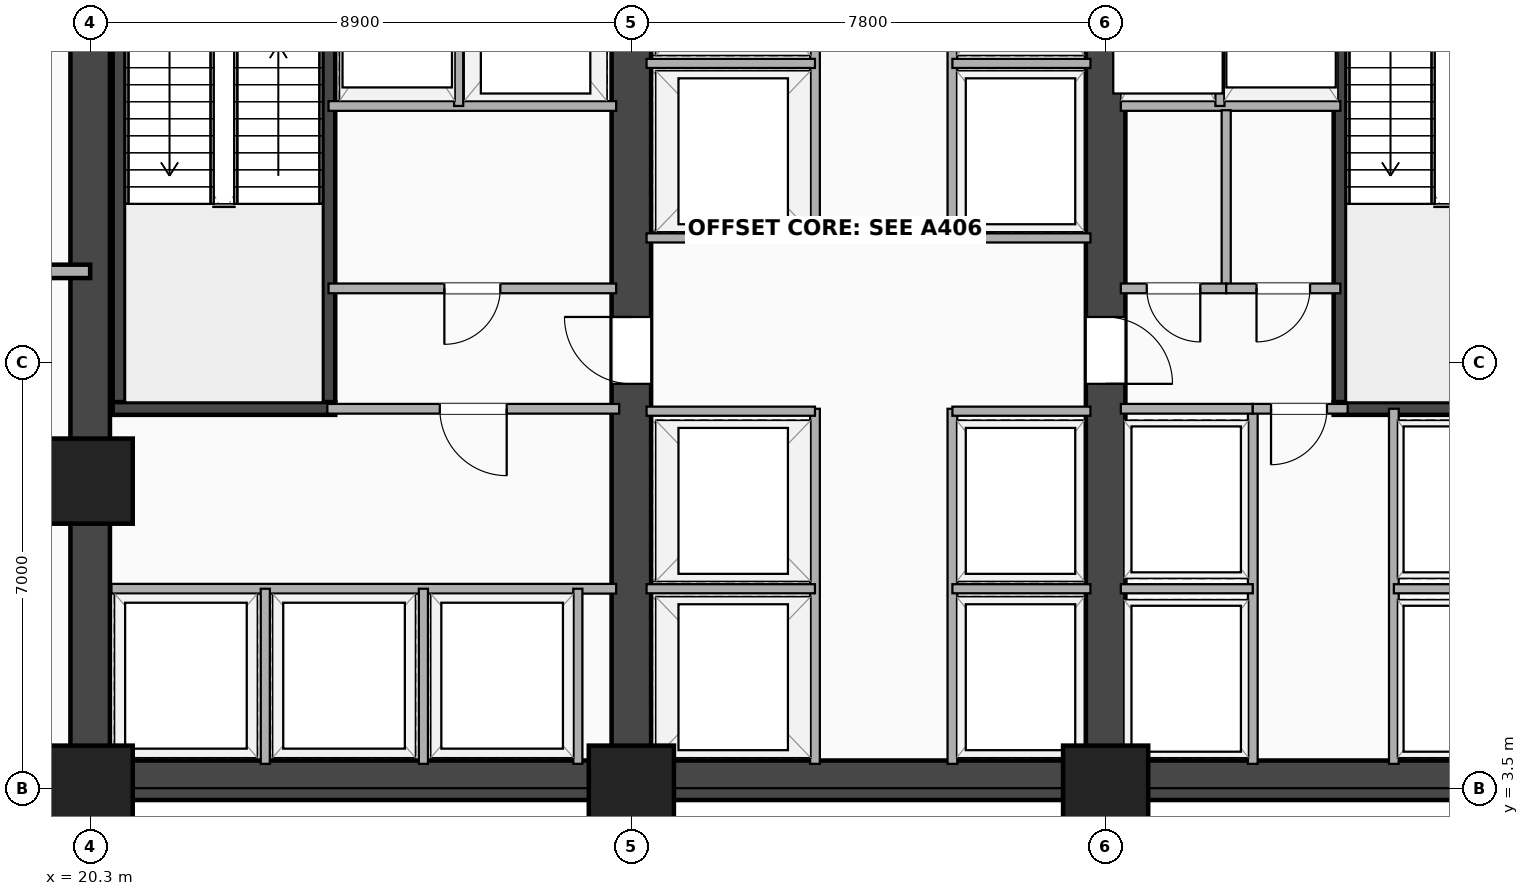
"""IFC4 building model, lengths in metres.
Left out: names, types, materials, properties, quantities, classifications, styles, units other than length and angle.
Written with IfcOpenShell. Run it as: python <this file> out.ifc"""

import sys

from ifc_helpers import new_model, si_unit, direction, frame, frame_2d, origin, origin_2d, place, context, subcontext, project, spatial, rectangle, extrude, element, fill, save


model = new_model("IFC4")
c1 = context("Model", 3, precision=1e-05, world=origin(), true_north=direction((0.0, 1.0)))
c2 = subcontext(c1, "Body", "Model", "MODEL_VIEW")
j1 = project(units=[si_unit("LENGTHUNIT", "METRE"), si_unit("PLANEANGLEUNIT", "RADIAN")], contexts=[c1])
p1 = place(None, origin())
s1 = spatial("IfcSite", under=j1, at=p1, CompositionType="ELEMENT")
p2 = place(p1, origin())
s2 = spatial("IfcBuilding", under=s1, at=p2, CompositionType="ELEMENT")
p3 = place(p2, frame((0.0, 0.0, 75.4)))
s3 = spatial("IfcBuildingStorey", under=s2, at=p3, CompositionType="ELEMENT", Elevation=75.4)
p4 = place(p3, frame((20.3, 3.63, 0.0), z_axis=(0.0, 0.0, 1.0), x_axis=(1.0, 0.0, 0.0)))
e1 = element("IfcWall", 1, at=p4, inside=s3, PredefinedType="SHEAR", context=c2, shape_type="SweptSolid", body=[
    extrude(rectangle(XDim=24.5, YDim=0.65, at=frame_2d((12.25, 0.0))), origin(), (0.0, 0.0, 1.0), 8.14),
])
p5 = place(p3, frame((20.3, 3.5, 0.0), z_axis=(0.0, 0.0, 1.0), x_axis=(0.0, 1.0, 0.0)))
e2 = element("IfcWall", 2, at=p5, inside=s3, PredefinedType="SHEAR", context=c2, shape_type="SweptSolid", body=[
    extrude(rectangle(XDim=16.9, YDim=0.65, at=frame_2d((8.45, 0.0))), origin(), (0.0, 0.0, 1.0), 8.14),
])
p6 = place(p3, frame((29.2, 3.5, 0.0), z_axis=(0.0, 0.0, 1.0), x_axis=(0.0, 1.0, 0.0)))
e3 = element("IfcWall", 3, at=p6, inside=s3, PredefinedType="SHEAR", context=c2, shape_type="SweptSolid", body=[
    extrude(rectangle(XDim=16.9, YDim=0.65, at=frame_2d((8.45, 0.0))), origin(), (0.0, 0.0, 1.0), 8.14),
])
p7 = place(p6, frame((7.75, 0.0, 0.0), z_axis=(0.0, 0.0, 1.0), x_axis=(-1.0, 0.0, 0.0)))
e4 = element("IfcOpeningElement", 4, at=p7, cuts=e3, PredefinedType="OPENING", context=c2, shape_type="SweptSolid", body=[
    extrude(rectangle(XDim=1.1, YDim=2.15, at=frame_2d((0.55, 1.075))), frame((0.0, 0.335, 0.0), z_axis=(0.0, -1.0, 0.0), x_axis=(1.0, 0.0, 0.0)), (0.0, 0.0, 1.0), 0.67),
])
p8 = place(p3, frame((37.0, 3.5, 0.0), z_axis=(0.0, 0.0, 1.0), x_axis=(0.0, 1.0, 0.0)))
e5 = element("IfcWall", 5, at=p8, inside=s3, PredefinedType="SHEAR", context=c2, shape_type="SweptSolid", body=[
    extrude(rectangle(XDim=16.9, YDim=0.65, at=frame_2d((8.45, 0.0))), origin(), (0.0, 0.0, 1.0), 8.14),
])
p9 = place(p8, frame((6.65, 0.0, 0.0)))
e6 = element("IfcOpeningElement", 6, at=p9, cuts=e5, PredefinedType="OPENING", context=c2, shape_type="SweptSolid", body=[
    extrude(rectangle(XDim=1.1, YDim=2.15, at=frame_2d((0.55, 1.075))), frame((0.0, 0.335, 0.0), z_axis=(0.0, -1.0, 0.0), x_axis=(1.0, 0.0, 0.0)), (0.0, 0.0, 1.0), 0.67),
])
for number, where, z_axis, x_axis in (
    (7, (20.775, 9.745, 0.0), (0.0, 0.0, 1.0), (0.0, 1.0, 0.0)),
    (8, (24.225, 9.745, 0.0), (0.0, 0.0, 1.0), (0.0, 1.0, 0.0)),
):
    element("IfcWall", number, at=place(p3, frame(where, z_axis=z_axis, x_axis=x_axis)), inside=s3, PredefinedType="SHEAR", context=c2, shape_type="SweptSolid", body=[
        extrude(rectangle(XDim=8.01, YDim=0.21, at=frame_2d((4.005, 0.0))), origin(), (0.0, 0.0, 1.0), 8.14),
    ])
p10 = place(p3, frame((20.67, 9.745, 0.0), z_axis=(0.0, 0.0, 1.0), x_axis=(1.0, 0.0, 0.0)))
e9 = element("IfcWall", 9, at=p10, inside=s3, PredefinedType="SHEAR", context=c2, shape_type="SweptSolid", body=[
    extrude(rectangle(XDim=3.66, YDim=0.21, at=frame_2d((1.83, 0.0))), origin(), (0.0, 0.0, 1.0), 8.14),
])
p11 = place(p3, frame((40.855, 9.745, 0.0), z_axis=(0.0, 0.0, 1.0), x_axis=(0.0, 1.0, 0.0)))
e10 = element("IfcWall", 10, at=p11, inside=s3, PredefinedType="SHEAR", context=c2, shape_type="SweptSolid", body=[
    extrude(rectangle(XDim=8.01, YDim=0.21, at=frame_2d((4.005, 0.0))), origin(), (0.0, 0.0, 1.0), 8.14),
])
p12 = place(p3, frame((40.75, 9.745, 0.0), z_axis=(0.0, 0.0, 1.0), x_axis=(1.0, 0.0, 0.0)))
e11 = element("IfcWall", 11, at=p12, inside=s3, PredefinedType="SHEAR", context=c2, shape_type="SweptSolid", body=[
    extrude(rectangle(XDim=3.66, YDim=0.21, at=frame_2d((1.83, 0.0))), origin(), (0.0, 0.0, 1.0), 8.14),
])
for number, where, z_axis, x_axis in (
    (12, (20.3, 3.5, -0.32), (0.0, 0.0, 1.0), (1.0, 0.0, 0.0)),
    (13, (29.2, 3.5, -0.32), (0.0, 0.0, 1.0), (1.0, 0.0, 0.0)),
    (14, (37.0, 3.5, -0.32), (0.0, 0.0, 1.0), (1.0, 0.0, 0.0)),
    (15, (20.3, 8.55, -0.32), (0.0, 0.0, 1.0), (1.0, 0.0, 0.0)),
):
    element("IfcColumn", number, at=place(p3, frame(where, z_axis=z_axis, x_axis=x_axis)), inside=s3, PredefinedType="COLUMN", context=c2, shape_type="SweptSolid", body=[
        extrude(rectangle(XDim=1.4, YDim=1.4, at=origin_2d()), origin(), (0.0, 0.0, 1.0), 8.46),
    ])
p13 = place(p3, frame((24.22, 14.72, 0.0), z_axis=(0.0, 0.0, 1.0), x_axis=(1.0, 0.0, 0.0)))
e16 = element("IfcWall", 16, at=p13, inside=s3, PredefinedType="PARTITIONING", context=c2, shape_type="SweptSolid", body=[
    extrude(rectangle(XDim=4.73, YDim=0.16, at=frame_2d((2.365, 0.0))), origin(), (0.0, 0.0, 1.0), 8.14),
])
p14 = place(p3, frame((26.36, 14.72, 0.0), z_axis=(0.0, 0.0, 1.0), x_axis=(0.0, 1.0, 0.0)))
e17 = element("IfcWall", 17, at=p14, inside=s3, PredefinedType="PARTITIONING", context=c2, shape_type="SweptSolid", body=[
    extrude(rectangle(XDim=3.04, YDim=0.15, at=frame_2d((1.52, 0.0))), origin(), (0.0, 0.0, 1.0), 8.14),
])
p15 = place(p3, frame((37.25, 14.72, 0.0), z_axis=(0.0, 0.0, 1.0), x_axis=(1.0, 0.0, 0.0)))
e18 = element("IfcWall", 18, at=p15, inside=s3, PredefinedType="PARTITIONING", context=c2, shape_type="SweptSolid", body=[
    extrude(rectangle(XDim=3.61, YDim=0.16, at=frame_2d((1.805, 0.0))), origin(), (0.0, 0.0, 1.0), 8.14),
])
p16 = place(p3, frame((38.88, 14.72, 0.0), z_axis=(0.0, 0.0, 1.0), x_axis=(0.0, 1.0, 0.0)))
e19 = element("IfcWall", 19, at=p16, inside=s3, PredefinedType="PARTITIONING", context=c2, shape_type="SweptSolid", body=[
    extrude(rectangle(XDim=3.04, YDim=0.15, at=frame_2d((1.52, 0.0))), origin(), (0.0, 0.0, 1.0), 8.14),
])
p17 = place(p3, frame((24.22, 11.72, 0.0), z_axis=(0.0, 0.0, 1.0), x_axis=(1.0, 0.0, 0.0)))
e20 = element("IfcWall", 20, at=p17, inside=s3, PredefinedType="PARTITIONING", context=c2, shape_type="SweptSolid", body=[
    extrude(rectangle(XDim=4.73, YDim=0.16, at=frame_2d((2.365, 0.0))), origin(), (0.0, 0.0, 1.0), 8.14),
])
p18 = place(p17, frame((1.905, 0.0, 0.0)))
e21 = element("IfcOpeningElement", 21, at=p18, cuts=e20, PredefinedType="OPENING", context=c2, shape_type="SweptSolid", body=[
    extrude(rectangle(XDim=0.92, YDim=2.08, at=frame_2d((0.46, 1.04))), frame((0.0, 0.09, 0.0), z_axis=(0.0, -1.0, 0.0), x_axis=(1.0, 0.0, 0.0)), (0.0, 0.0, 1.0), 0.18),
])
p19 = place(p3, frame((38.983, 11.72, 0.0), z_axis=(0.0, 0.0, 1.0), x_axis=(0.0, 1.0, 0.0)))
e22 = element("IfcWall", 22, at=p19, inside=s3, PredefinedType="PARTITIONING", context=c2, shape_type="SweptSolid", body=[
    extrude(rectangle(XDim=2.93, YDim=0.15, at=frame_2d((1.465, 0.0))), origin(), (0.0, 0.0, 1.0), 8.14),
])
p20 = place(p3, frame((37.25, 11.72, 0.0), z_axis=(0.0, 0.0, 1.0), x_axis=(1.0, 0.0, 0.0)))
e23 = element("IfcWall", 23, at=p20, inside=s3, PredefinedType="PARTITIONING", context=c2, shape_type="SweptSolid", body=[
    extrude(rectangle(XDim=1.733, YDim=0.16, at=frame_2d((0.866, 0.0))), origin(), (0.0, 0.0, 1.0), 8.14),
])
p21 = place(p20, frame((0.427, 0.0, 0.0)))
e24 = element("IfcOpeningElement", 24, at=p21, cuts=e23, PredefinedType="OPENING", context=c2, shape_type="SweptSolid", body=[
    extrude(rectangle(XDim=0.88, YDim=2.08, at=frame_2d((0.44, 1.04))), frame((0.0, 0.09, 0.0), z_axis=(0.0, -1.0, 0.0), x_axis=(1.0, 0.0, 0.0)), (0.0, 0.0, 1.0), 0.18),
])
p22 = place(p3, frame((38.983, 11.72, 0.0), z_axis=(0.0, 0.0, 1.0), x_axis=(1.0, 0.0, 0.0)))
e25 = element("IfcWall", 25, at=p22, inside=s3, PredefinedType="PARTITIONING", context=c2, shape_type="SweptSolid", body=[
    extrude(rectangle(XDim=1.877, YDim=0.16, at=frame_2d((0.938, 0.0))), origin(), (0.0, 0.0, 1.0), 8.14),
])
p23 = place(p22, frame((0.499, 0.0, 0.0)))
e26 = element("IfcOpeningElement", 26, at=p23, cuts=e25, PredefinedType="OPENING", context=c2, shape_type="SweptSolid", body=[
    extrude(rectangle(XDim=0.88, YDim=2.08, at=frame_2d((0.44, 1.04))), frame((0.0, 0.09, 0.0), z_axis=(0.0, -1.0, 0.0), x_axis=(1.0, 0.0, 0.0)), (0.0, 0.0, 1.0), 0.18),
])
p24 = place(p3, frame((20.65, 6.78, 0.0), z_axis=(0.0, 0.0, 1.0), x_axis=(1.0, 0.0, 0.0)))
e27 = element("IfcWall", 27, at=p24, inside=s3, PredefinedType="PARTITIONING", context=c2, shape_type="SweptSolid", body=[
    extrude(rectangle(XDim=8.3, YDim=0.16, at=frame_2d((4.15, 0.0))), origin(), (0.0, 0.0, 1.0), 7.43),
])
for number, where, z_axis, x_axis in (
    (28, (23.18, 3.9, 0.0), (0.0, 0.0, 1.0), (0.0, 1.0, 0.0)),
    (29, (25.78, 3.9, 0.0), (0.0, 0.0, 1.0), (0.0, 1.0, 0.0)),
    (30, (28.32, 3.9, 0.0), (0.0, 0.0, 1.0), (0.0, 1.0, 0.0)),
):
    element("IfcWall", number, at=place(p3, frame(where, z_axis=z_axis, x_axis=x_axis)), inside=s3, PredefinedType="PARTITIONING", context=c2, shape_type="SweptSolid", body=[
        extrude(rectangle(XDim=2.88, YDim=0.15, at=frame_2d((1.44, 0.0))), origin(), (0.0, 0.0, 1.0), 8.14),
    ])
p25 = place(p3, frame((24.2, 9.74, 0.0), z_axis=(0.0, 0.0, 1.0), x_axis=(1.0, 0.0, 0.0)))
e31 = element("IfcWall", 31, at=p25, inside=s3, PredefinedType="PARTITIONING", context=c2, shape_type="SweptSolid", body=[
    extrude(rectangle(XDim=4.8, YDim=0.16, at=frame_2d((2.4, 0.0))), origin(), (0.0, 0.0, 1.0), 8.14),
])
p26 = place(p25, frame((1.85, 0.0, 0.0)))
e32 = element("IfcOpeningElement", 32, at=p26, cuts=e31, PredefinedType="OPENING", context=c2, shape_type="SweptSolid", body=[
    extrude(rectangle(XDim=1.1, YDim=2.15, at=frame_2d((0.55, 1.075))), frame((0.0, 0.09, 0.0), z_axis=(0.0, -1.0, 0.0), x_axis=(1.0, 0.0, 0.0)), (0.0, 0.0, 1.0), 0.18),
])
for number, where, z_axis, x_axis in (
    (33, (39.42, 3.9, 0.0), (0.0, 0.0, 1.0), (0.0, 1.0, 0.0)),
    (34, (41.74, 3.9, 0.0), (0.0, 0.0, 1.0), (0.0, 1.0, 0.0)),
):
    element("IfcWall", number, at=place(p3, frame(where, z_axis=z_axis, x_axis=x_axis)), inside=s3, PredefinedType="PARTITIONING", context=c2, shape_type="SweptSolid", body=[
        extrude(rectangle(XDim=5.84, YDim=0.16, at=frame_2d((2.92, 0.0))), origin(), (0.0, 0.0, 1.0), 8.14),
    ])
p27 = place(p3, frame((37.25, 6.78, 0.0), z_axis=(0.0, 0.0, 1.0), x_axis=(1.0, 0.0, 0.0)))
e35 = element("IfcWall", 35, at=p27, inside=s3, PredefinedType="PARTITIONING", context=c2, shape_type="SweptSolid", body=[
    extrude(rectangle(XDim=2.17, YDim=0.15, at=frame_2d((1.085, 0.0))), origin(), (0.0, 0.0, 1.0), 8.14),
])
p28 = place(p3, frame((41.74, 6.78, 0.0), z_axis=(0.0, 0.0, 1.0), x_axis=(1.0, 0.0, 0.0)))
e36 = element("IfcWall", 36, at=p28, inside=s3, PredefinedType="PARTITIONING", context=c2, shape_type="SweptSolid", body=[
    extrude(rectangle(XDim=2.66, YDim=0.15, at=frame_2d((1.33, 0.0))), origin(), (0.0, 0.0, 1.0), 6.445),
])
p29 = place(p3, frame((37.25, 9.74, 0.0), z_axis=(0.0, 0.0, 1.0), x_axis=(1.0, 0.0, 0.0)))
e37 = element("IfcWall", 37, at=p29, inside=s3, PredefinedType="PARTITIONING", context=c2, shape_type="SweptSolid", body=[
    extrude(rectangle(XDim=2.17, YDim=0.16, at=frame_2d((1.085, 0.0))), origin(), (0.0, 0.0, 1.0), 8.14),
])
p30 = place(p3, frame((39.42, 9.74, 0.0), z_axis=(0.0, 0.0, 1.0), x_axis=(1.0, 0.0, 0.0)))
e38 = element("IfcWall", 38, at=p30, inside=s3, PredefinedType="PARTITIONING", context=c2, shape_type="SweptSolid", body=[
    extrude(rectangle(XDim=1.56, YDim=0.16, at=frame_2d((0.78, 0.0))), origin(), (0.0, 0.0, 1.0), 8.14),
])
p31 = place(p30, frame((0.3, 0.0, 0.0)))
e39 = element("IfcOpeningElement", 39, at=p31, cuts=e38, PredefinedType="OPENING", context=c2, shape_type="SweptSolid", body=[
    extrude(rectangle(XDim=0.92, YDim=2.08, at=frame_2d((0.46, 1.04))), frame((0.0, 0.09, 0.0), z_axis=(0.0, -1.0, 0.0), x_axis=(1.0, 0.0, 0.0)), (0.0, 0.0, 1.0), 0.18),
])
for number, where, z_axis, x_axis in (
    (40, (32.22, 3.9, 0.0), (0.0, 0.0, 1.0), (0.0, 1.0, 0.0)),
    (41, (34.48, 3.9, 0.0), (0.0, 0.0, 1.0), (0.0, 1.0, 0.0)),
):
    element("IfcWall", number, at=place(p3, frame(where, z_axis=z_axis, x_axis=x_axis)), inside=s3, PredefinedType="PARTITIONING", context=c2, shape_type="SweptSolid", body=[
        extrude(rectangle(XDim=5.84, YDim=0.16, at=frame_2d((2.92, 0.0))), origin(), (0.0, 0.0, 1.0), 8.14),
    ])
p32 = place(p3, frame((29.45, 6.78, 0.0), z_axis=(0.0, 0.0, 1.0), x_axis=(1.0, 0.0, 0.0)))
e42 = element("IfcWall", 42, at=p32, inside=s3, PredefinedType="PARTITIONING", context=c2, shape_type="SweptSolid", body=[
    extrude(rectangle(XDim=2.77, YDim=0.15, at=frame_2d((1.385, 0.0))), origin(), (0.0, 0.0, 1.0), 8.14),
])
p33 = place(p3, frame((34.48, 6.78, 0.0), z_axis=(0.0, 0.0, 1.0), x_axis=(1.0, 0.0, 0.0)))
e43 = element("IfcWall", 43, at=p33, inside=s3, PredefinedType="PARTITIONING", context=c2, shape_type="SweptSolid", body=[
    extrude(rectangle(XDim=2.27, YDim=0.15, at=frame_2d((1.135, 0.0))), origin(), (0.0, 0.0, 1.0), 8.14),
])
p34 = place(p3, frame((29.45, 9.7, 0.0), z_axis=(0.0, 0.0, 1.0), x_axis=(1.0, 0.0, 0.0)))
e44 = element("IfcWall", 44, at=p34, inside=s3, PredefinedType="PARTITIONING", context=c2, shape_type="SweptSolid", body=[
    extrude(rectangle(XDim=2.77, YDim=0.15, at=frame_2d((1.385, 0.0))), origin(), (0.0, 0.0, 1.0), 8.14),
])
p35 = place(p3, frame((34.48, 9.7, 0.0), z_axis=(0.0, 0.0, 1.0), x_axis=(1.0, 0.0, 0.0)))
e45 = element("IfcWall", 45, at=p35, inside=s3, PredefinedType="PARTITIONING", context=c2, shape_type="SweptSolid", body=[
    extrude(rectangle(XDim=2.27, YDim=0.15, at=frame_2d((1.135, 0.0))), origin(), (0.0, 0.0, 1.0), 8.14),
])
p36 = place(p3, frame((32.22, 12.5, 0.0), z_axis=(0.0, 0.0, 1.0), x_axis=(0.0, 1.0, 0.0)))
e46 = element("IfcWall", 46, at=p36, inside=s3, PredefinedType="PARTITIONING", context=c2, shape_type="SweptSolid", body=[
    extrude(rectangle(XDim=7.92, YDim=0.16, at=frame_2d((3.96, 0.0))), origin(), (0.0, 0.0, 1.0), 7.43),
])
p37 = place(p36, frame((6.1, 0.0, 0.0)))
e47 = element("IfcOpeningElement", 47, at=p37, cuts=e46, PredefinedType="OPENING", context=c2, shape_type="SweptSolid", body=[
    extrude(rectangle(XDim=0.88, YDim=2.08, at=frame_2d((0.44, 1.04))), frame((0.0, 0.09, 0.0), z_axis=(0.0, -1.0, 0.0), x_axis=(1.0, 0.0, 0.0)), (0.0, 0.0, 1.0), 0.18),
])
p38 = place(p3, frame((34.48, 12.5, 0.0), z_axis=(0.0, 0.0, 1.0), x_axis=(0.0, 1.0, 0.0)))
e48 = element("IfcWall", 48, at=p38, inside=s3, PredefinedType="PARTITIONING", context=c2, shape_type="SweptSolid", body=[
    extrude(rectangle(XDim=7.92, YDim=0.16, at=frame_2d((3.96, 0.0))), origin(), (0.0, 0.0, 1.0), 7.43),
])
p39 = place(p38, frame((6.98, 0.0, 0.0), z_axis=(0.0, 0.0, 1.0), x_axis=(-1.0, 0.0, 0.0)))
e49 = element("IfcOpeningElement", 49, at=p39, cuts=e48, PredefinedType="OPENING", context=c2, shape_type="SweptSolid", body=[
    extrude(rectangle(XDim=0.88, YDim=2.08, at=frame_2d((0.44, 1.04))), frame((0.0, 0.09, 0.0), z_axis=(0.0, -1.0, 0.0), x_axis=(1.0, 0.0, 0.0)), (0.0, 0.0, 1.0), 0.18),
])
p40 = place(p3, frame((29.45, 12.55, 0.0), z_axis=(0.0, 0.0, 1.0), x_axis=(1.0, 0.0, 0.0)))
e50 = element("IfcWall", 50, at=p40, inside=s3, PredefinedType="PARTITIONING", context=c2, shape_type="SweptSolid", body=[
    extrude(rectangle(XDim=2.77, YDim=0.15, at=frame_2d((1.385, 0.0))), origin(), (0.0, 0.0, 1.0), 8.14),
])
p41 = place(p3, frame((34.48, 12.55, 0.0), z_axis=(0.0, 0.0, 1.0), x_axis=(1.0, 0.0, 0.0)))
e51 = element("IfcWall", 51, at=p41, inside=s3, PredefinedType="PARTITIONING", context=c2, shape_type="SweptSolid", body=[
    extrude(rectangle(XDim=2.27, YDim=0.15, at=frame_2d((1.135, 0.0))), origin(), (0.0, 0.0, 1.0), 8.14),
])
p42 = place(p3, frame((29.45, 15.42, 0.0), z_axis=(0.0, 0.0, 1.0), x_axis=(1.0, 0.0, 0.0)))
e52 = element("IfcWall", 52, at=p42, inside=s3, PredefinedType="PARTITIONING", context=c2, shape_type="SweptSolid", body=[
    extrude(rectangle(XDim=2.77, YDim=0.15, at=frame_2d((1.385, 0.0))), origin(), (0.0, 0.0, 1.0), 8.14),
])
p43 = place(p3, frame((34.48, 15.42, 0.0), z_axis=(0.0, 0.0, 1.0), x_axis=(1.0, 0.0, 0.0)))
e53 = element("IfcWall", 53, at=p43, inside=s3, PredefinedType="PARTITIONING", context=c2, shape_type="SweptSolid", body=[
    extrude(rectangle(XDim=2.27, YDim=0.15, at=frame_2d((1.135, 0.0))), origin(), (0.0, 0.0, 1.0), 8.14),
])
p44 = place(p3, frame((15.45, 12.0, 0.0), z_axis=(0.0, 0.0, 1.0), x_axis=(1.0, 0.0, 0.0)))
e54 = element("IfcWall", 54, at=p44, inside=s3, PredefinedType="PARTITIONING", context=c2, shape_type="SweptSolid", body=[
    extrude(rectangle(XDim=4.85, YDim=0.22, at=frame_2d((2.425, 0.0))), origin(), (0.0, 0.0, 1.0), 7.43),
])
p45 = place(p7, origin())
e55 = element("IfcDoor", 55, at=p45, inside=s3, OperationType="SINGLE_SWING_RIGHT", PredefinedType="DOOR", context=c2, shape_type="SweptSolid", body=[
    extrude(rectangle(XDim=1.1, YDim=2.15, at=frame_2d((0.55, 1.075))), frame((0.0, 0.025, 0.0), z_axis=(0.0, -1.0, 0.0), x_axis=(1.0, 0.0, 0.0)), (0.0, 0.0, 1.0), 0.05),
])
fill(e4, e55)
p46 = place(p9, origin())
e56 = element("IfcDoor", 56, at=p46, inside=s3, OperationType="SINGLE_SWING_LEFT", PredefinedType="DOOR", context=c2, shape_type="SweptSolid", body=[
    extrude(rectangle(XDim=1.1, YDim=2.15, at=frame_2d((0.55, 1.075))), frame((0.0, 0.025, 0.0), z_axis=(0.0, -1.0, 0.0), x_axis=(1.0, 0.0, 0.0)), (0.0, 0.0, 1.0), 0.05),
])
fill(e6, e56)
p47 = place(p18, origin())
e57 = element("IfcDoor", 57, at=p47, inside=s3, OperationType="SINGLE_SWING_LEFT", PredefinedType="DOOR", context=c2, shape_type="SweptSolid", body=[
    extrude(rectangle(XDim=0.92, YDim=2.08, at=frame_2d((0.46, 1.04))), frame((0.0, 0.025, 0.0), z_axis=(0.0, -1.0, 0.0), x_axis=(1.0, 0.0, 0.0)), (0.0, 0.0, 1.0), 0.05),
])
fill(e21, e57)
p48 = place(p21, origin())
e58 = element("IfcDoor", 58, at=p48, inside=s3, OperationType="SINGLE_SWING_RIGHT", PredefinedType="DOOR", context=c2, shape_type="SweptSolid", body=[
    extrude(rectangle(XDim=0.88, YDim=2.08, at=frame_2d((0.44, 1.04))), frame((0.0, 0.025, 0.0), z_axis=(0.0, -1.0, 0.0), x_axis=(1.0, 0.0, 0.0)), (0.0, 0.0, 1.0), 0.05),
])
fill(e24, e58)
p49 = place(p23, origin())
e59 = element("IfcDoor", 59, at=p49, inside=s3, OperationType="SINGLE_SWING_LEFT", PredefinedType="DOOR", context=c2, shape_type="SweptSolid", body=[
    extrude(rectangle(XDim=0.88, YDim=2.08, at=frame_2d((0.44, 1.04))), frame((0.0, 0.025, 0.0), z_axis=(0.0, -1.0, 0.0), x_axis=(1.0, 0.0, 0.0)), (0.0, 0.0, 1.0), 0.05),
])
fill(e26, e59)
p50 = place(p26, origin())
e60 = element("IfcDoor", 60, at=p50, inside=s3, OperationType="SINGLE_SWING_RIGHT", PredefinedType="DOOR", context=c2, shape_type="SweptSolid", body=[
    extrude(rectangle(XDim=1.1, YDim=2.15, at=frame_2d((0.55, 1.075))), frame((0.0, 0.025, 0.0), z_axis=(0.0, -1.0, 0.0), x_axis=(1.0, 0.0, 0.0)), (0.0, 0.0, 1.0), 0.05),
])
fill(e32, e60)
p51 = place(p31, origin())
e61 = element("IfcDoor", 61, at=p51, inside=s3, OperationType="SINGLE_SWING_LEFT", PredefinedType="DOOR", context=c2, shape_type="SweptSolid", body=[
    extrude(rectangle(XDim=0.92, YDim=2.08, at=frame_2d((0.46, 1.04))), frame((0.0, 0.025, 0.0), z_axis=(0.0, -1.0, 0.0), x_axis=(1.0, 0.0, 0.0)), (0.0, 0.0, 1.0), 0.05),
])
fill(e39, e61)
save(model, sys.argv[1])
